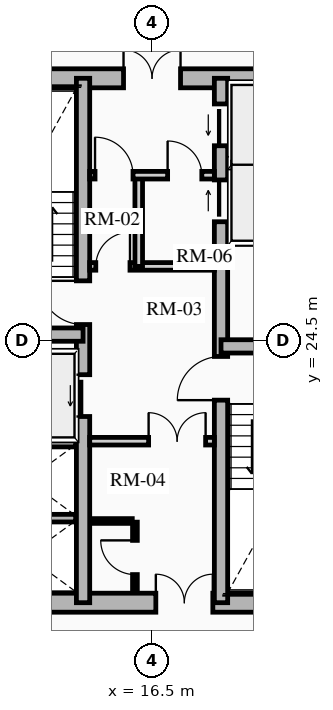
"""IFC4 building model, lengths in metres.
Left out: names, types, materials, properties, quantities, classifications, styles, units other than length and angle.
Written with IfcOpenShell. Run it as: python <this file> out.ifc"""

import sys

from ifc_helpers import new_model, si_unit, direction, frame, frame_2d, origin, place, context, subcontext, project, spatial, rectangle, extrude, source, transform, mapped, element, fill, save


model = new_model("IFC4")
c1 = context("Model", 3, precision=1e-05, world=origin(), true_north=direction((0.0, 1.0)))
c2 = subcontext(c1, "Body", "Model", "MODEL_VIEW")
j1 = project(units=[si_unit("LENGTHUNIT", "METRE"), si_unit("PLANEANGLEUNIT", "RADIAN")], contexts=[c1])
p1 = place(None, origin())
s1 = spatial("IfcSite", under=j1, at=p1, CompositionType="ELEMENT")
p2 = place(p1, origin())
s2 = spatial("IfcBuilding", under=s1, at=p2, CompositionType="ELEMENT")
p3 = place(p2, frame((0.0, 0.0, 59.83)))
s3 = spatial("IfcBuildingStorey", under=s2, at=p3, CompositionType="ELEMENT", Elevation=59.83)
p4 = place(p3, frame((11.15, 17.6, 0.0), z_axis=(0.0, 0.0, 1.0), x_axis=(1.0, 0.0, 0.0)))
e1 = element("IfcWall", 1, at=p4, inside=s3, PredefinedType="SHEAR", context=c2, shape_type="SweptSolid", body=[
    extrude(rectangle(XDim=10.7, YDim=0.5, at=frame_2d((5.35, 0.0))), origin(), (0.0, 0.0, 1.0), 2.91),
])
m1 = source(origin(), c2, "Body", "SweptSolid", [
    extrude(rectangle(XDim=1.5, YDim=2.02, at=frame_2d((0.75, 1.01))), frame((0.0, 0.26, 0.0), z_axis=(0.0, -1.0, 0.0), x_axis=(1.0, 0.0, 0.0)), (0.0, 0.0, 1.0), 0.52),
])
p5 = place(p4, frame((5.45, 0.0, 0.0)))
e2 = element("IfcOpeningElement", 2, at=p5, cuts=e1, PredefinedType="OPENING", context=c2, shape_type="MappedRepresentation", body=[
    mapped(m1, transform((0.0, 0.0, 0.0), x_axis=(1.0, 0.0, 0.0), y_axis=(0.0, 1.0, 0.0), z_axis=(0.0, 0.0, 1.0), scale=1.0)),
])
p6 = place(p3, frame((11.15, 31.4, 0.0), z_axis=(0.0, 0.0, 1.0), x_axis=(1.0, 0.0, 0.0)))
e3 = element("IfcWall", 3, at=p6, inside=s3, PredefinedType="SHEAR", context=c2, shape_type="SweptSolid", body=[
    extrude(rectangle(XDim=10.7, YDim=0.5, at=frame_2d((5.35, 0.0))), origin(), (0.0, 0.0, 1.0), 2.91),
])
p7 = place(p6, frame((4.6, 0.0, 0.0)))
e4 = element("IfcOpeningElement", 4, at=p7, cuts=e3, PredefinedType="OPENING", context=c2, shape_type="MappedRepresentation", body=[
    mapped(m1, transform((0.0, 0.0, 0.0), x_axis=(1.0, 0.0, 0.0), y_axis=(0.0, 1.0, 0.0), z_axis=(0.0, 0.0, 1.0), scale=1.0)),
])
p8 = place(p3, frame((14.685, 17.6, 0.0), z_axis=(0.0, 0.0, 1.0), x_axis=(0.0, 1.0, 0.0)))
e5 = element("IfcWall", 5, at=p8, inside=s3, PredefinedType="SHEAR", context=c2, shape_type="SweptSolid", body=[
    extrude(rectangle(XDim=13.8, YDim=0.35, at=frame_2d((6.9, 0.0))), origin(), (0.0, 0.0, 1.0), 2.91),
])
m2 = source(origin(), c2, "Body", "SweptSolid", [
    extrude(rectangle(XDim=1.1, YDim=2.015, at=frame_2d((0.55, 1.007))), frame((0.0, 0.185, 0.0), z_axis=(0.0, -1.0, 0.0), x_axis=(1.0, 0.0, 0.0)), (0.0, 0.0, 1.0), 0.37),
])
p9 = place(p8, frame((4.9, 0.0, 0.0)))
e6 = element("IfcOpeningElement", 6, at=p9, cuts=e5, PredefinedType="OPENING", context=c2, shape_type="MappedRepresentation", body=[
    mapped(m2, transform((0.0, 0.0, 0.0), x_axis=(1.0, 0.0, 0.0), y_axis=(0.0, 1.0, 0.0), z_axis=(0.0, 0.0, 1.0), scale=1.0)),
])
m3 = source(origin(), c2, "Body", "SweptSolid", [
    extrude(rectangle(XDim=1.15, YDim=2.02, at=frame_2d((0.575, 1.01))), frame((0.0, 0.185, 0.0), z_axis=(0.0, -1.0, 0.0), x_axis=(1.0, 0.0, 0.0)), (0.0, 0.0, 1.0), 0.37),
])
p10 = place(p8, frame((7.32, 0.0, 0.0)))
e7 = element("IfcOpeningElement", 7, at=p10, cuts=e5, PredefinedType="OPENING", context=c2, shape_type="MappedRepresentation", body=[
    mapped(m3, transform((0.0, 0.0, 0.0), x_axis=(1.0, 0.0, 0.0), y_axis=(0.0, 1.0, 0.0), z_axis=(0.0, 0.0, 1.0), scale=1.0)),
])
p11 = place(p3, frame((18.315, 17.6, 0.0), z_axis=(0.0, 0.0, 1.0), x_axis=(0.0, 1.0, 0.0)))
e8 = element("IfcWall", 8, at=p11, inside=s3, PredefinedType="SHEAR", context=c2, shape_type="SweptSolid", body=[
    extrude(rectangle(XDim=13.8, YDim=0.35, at=frame_2d((6.9, 0.0))), origin(), (0.0, 0.0, 1.0), 2.91),
])
p12 = place(p11, frame((10.025, 0.0, 0.0)))
e9 = element("IfcOpeningElement", 9, at=p12, cuts=e8, PredefinedType="OPENING", context=c2, shape_type="MappedRepresentation", body=[
    mapped(m2, transform((0.0, 0.0, 0.0), x_axis=(1.0, 0.0, 0.0), y_axis=(0.0, 1.0, 0.0), z_axis=(0.0, 0.0, 1.0), scale=1.0)),
])
p13 = place(p11, frame((12.025, 0.0, 0.0)))
e10 = element("IfcOpeningElement", 10, at=p13, cuts=e8, PredefinedType="OPENING", context=c2, shape_type="MappedRepresentation", body=[
    mapped(m2, transform((0.0, 0.0, 0.0), x_axis=(1.0, 0.0, 0.0), y_axis=(0.0, 1.0, 0.0), z_axis=(0.0, 0.0, 1.0), scale=1.0)),
])
p14 = place(p11, frame((5.33, 0.0, 0.0)))
e11 = element("IfcOpeningElement", 11, at=p14, cuts=e8, PredefinedType="OPENING", context=c2, shape_type="MappedRepresentation", body=[
    mapped(m3, transform((0.0, 0.0, 0.0), x_axis=(1.0, 0.0, 0.0), y_axis=(0.0, 1.0, 0.0), z_axis=(0.0, 0.0, 1.0), scale=1.0)),
])
for number, where, z_axis, x_axis in (
    (12, (11.4, 24.655, 0.0), (0.0, 0.0, 1.0), (1.0, 0.0, 0.0)),
    (13, (18.315, 24.345, 0.0), (0.0, 0.0, 1.0), (1.0, 0.0, 0.0)),
):
    element("IfcWall", number, at=place(p3, frame(where, z_axis=z_axis, x_axis=x_axis)), inside=s3, PredefinedType="SHEAR", context=c2, shape_type="SweptSolid", body=[
        extrude(rectangle(XDim=3.285, YDim=0.35, at=frame_2d((1.643, 0.0))), origin(), (0.0, 0.0, 1.0), 2.91),
    ])
for number, where, z_axis, x_axis in (
    (14, (11.52, 21.8, 0.0), (0.0, 0.0, 1.0), (1.0, 0.0, 0.0)),
    (15, (11.52, 19.825, 0.0), (0.0, 0.0, 1.0), (1.0, 0.0, 0.0)),
    (16, (18.51, 27.13, 0.0), (0.0, 0.0, 1.0), (1.0, 0.0, 0.0)),
    (17, (18.51, 29.175, 0.0), (0.0, 0.0, 1.0), (1.0, 0.0, 0.0)),
):
    element("IfcWall", number, at=place(p3, frame(where, z_axis=z_axis, x_axis=x_axis)), inside=s3, PredefinedType="SHEAR", context=c2, shape_type="SweptSolid", body=[
        extrude(rectangle(XDim=2.97, YDim=0.2, at=frame_2d((1.485, 0.0))), origin(), (0.0, 0.0, 1.0), 2.91),
    ])
p15 = place(p3, frame((14.86, 21.85, 0.0), z_axis=(0.0, 0.0, 1.0), x_axis=(1.0, 0.0, 0.0)))
e18 = element("IfcWall", 18, at=p15, inside=s3, PredefinedType="PARTITIONING", context=c2, shape_type="SweptSolid", body=[
    extrude(rectangle(XDim=3.28, YDim=0.2, at=frame_2d((1.64, 0.0))), origin(), (0.0, 0.0, 1.0), 2.635),
])
m4 = source(origin(), c2, "Body", "SweptSolid", [
    extrude(rectangle(XDim=1.5, YDim=2.02, at=frame_2d((0.75, 1.01))), frame((0.0, 0.11, 0.0), z_axis=(0.0, -1.0, 0.0), x_axis=(1.0, 0.0, 0.0)), (0.0, 0.0, 1.0), 0.22),
])
p16 = place(p15, frame((1.55, 0.0, 0.0)))
e19 = element("IfcOpeningElement", 19, at=p16, cuts=e18, PredefinedType="OPENING", context=c2, shape_type="MappedRepresentation", body=[
    mapped(m4, transform((0.0, 0.0, 0.0), x_axis=(1.0, 0.0, 0.0), y_axis=(0.0, 1.0, 0.0), z_axis=(0.0, 0.0, 1.0), scale=1.0)),
])
p17 = place(p3, frame((14.86, 26.45, 0.0), z_axis=(0.0, 0.0, 1.0), x_axis=(1.0, 0.0, 0.0)))
e20 = element("IfcWall", 20, at=p17, inside=s3, PredefinedType="PARTITIONING", context=c2, shape_type="SweptSolid", body=[
    extrude(rectangle(XDim=3.28, YDim=0.2, at=frame_2d((1.64, 0.0))), origin(), (0.0, 0.0, 1.0), 2.635),
])
m5 = source(origin(), c2, "Body", "SweptSolid", [
    extrude(rectangle(XDim=0.9, YDim=2.005, at=frame_2d((0.45, 1.002))), frame((0.0, 0.11, 0.0), z_axis=(0.0, -1.0, 0.0), x_axis=(1.0, 0.0, 0.0)), (0.0, 0.0, 1.0), 0.22),
])
p18 = place(p17, frame((0.16, 0.0, 0.0)))
e21 = element("IfcOpeningElement", 21, at=p18, cuts=e20, PredefinedType="OPENING", context=c2, shape_type="MappedRepresentation", body=[
    mapped(m5, transform((0.0, 0.0, 0.0), x_axis=(1.0, 0.0, 0.0), y_axis=(0.0, 1.0, 0.0), z_axis=(0.0, 0.0, 1.0), scale=1.0)),
])
p19 = place(p3, frame((16.15, 26.45, 0.0), z_axis=(0.0, 0.0, 1.0), x_axis=(0.0, 1.0, 0.0)))
e22 = element("IfcWall", 22, at=p19, inside=s3, PredefinedType="PARTITIONING", context=c2, shape_type="SweptSolid", body=[
    extrude(rectangle(XDim=2.4, YDim=0.2, at=frame_2d((1.2, 0.0))), origin(), (0.0, 0.0, 1.0), 2.635),
])
p20 = place(p3, frame((14.86, 28.85, 0.0), z_axis=(0.0, 0.0, 1.0), x_axis=(1.0, 0.0, 0.0)))
e23 = element("IfcWall", 23, at=p20, inside=s3, PredefinedType="PARTITIONING", context=c2, shape_type="SweptSolid", body=[
    extrude(rectangle(XDim=3.28, YDim=0.2, at=frame_2d((1.64, 0.0))), origin(), (0.0, 0.0, 1.0), 2.635),
])
m6 = source(origin(), c2, "Body", "SweptSolid", [
    extrude(rectangle(XDim=1.0, YDim=2.015, at=frame_2d((0.5, 1.007))), frame((0.0, 0.11, 0.0), z_axis=(0.0, -1.0, 0.0), x_axis=(1.0, 0.0, 0.0)), (0.0, 0.0, 1.0), 0.22),
])
p21 = place(p20, frame((0.14, 0.0, 0.0)))
e24 = element("IfcOpeningElement", 24, at=p21, cuts=e23, PredefinedType="OPENING", context=c2, shape_type="MappedRepresentation", body=[
    mapped(m6, transform((0.0, 0.0, 0.0), x_axis=(1.0, 0.0, 0.0), y_axis=(0.0, 1.0, 0.0), z_axis=(0.0, 0.0, 1.0), scale=1.0)),
])
p22 = place(p20, frame((2.05, 0.0, 0.0)))
e25 = element("IfcOpeningElement", 25, at=p22, cuts=e23, PredefinedType="OPENING", context=c2, shape_type="MappedRepresentation", body=[
    mapped(m5, transform((0.0, 0.0, 0.0), x_axis=(1.0, 0.0, 0.0), y_axis=(0.0, 1.0, 0.0), z_axis=(0.0, 0.0, 1.0), scale=1.0)),
])
p23 = place(p3, frame((16.05, 17.92, 0.0), z_axis=(0.0, 0.0, 1.0), x_axis=(0.0, 1.0, 0.0)))
e26 = element("IfcWall", 26, at=p23, inside=s3, PredefinedType="PARTITIONING", context=c2, shape_type="SweptSolid", body=[
    extrude(rectangle(XDim=1.8, YDim=0.125, at=frame_2d((0.9, 0.0))), origin(), (0.0, 0.0, 1.0), 2.635),
])
m7 = source(origin(), c2, "Body", "SweptSolid", [
    extrude(rectangle(XDim=0.9, YDim=2.005, at=frame_2d((0.45, 1.002))), frame((0.0, 0.073, 0.0), z_axis=(0.0, -1.0, 0.0), x_axis=(1.0, 0.0, 0.0)), (0.0, 0.0, 1.0), 0.145),
])
p24 = place(p23, frame((0.42, 0.0, 0.0)))
e27 = element("IfcOpeningElement", 27, at=p24, cuts=e26, PredefinedType="OPENING", context=c2, shape_type="MappedRepresentation", body=[
    mapped(m7, transform((0.0, 0.0, 0.0), x_axis=(1.0, 0.0, 0.0), y_axis=(0.0, 1.0, 0.0), z_axis=(0.0, 0.0, 1.0), scale=1.0)),
])
p25 = place(p3, frame((14.88, 19.75, 0.0), z_axis=(0.0, 0.0, 1.0), x_axis=(1.0, 0.0, 0.0)))
e28 = element("IfcWall", 28, at=p25, inside=s3, PredefinedType="PARTITIONING", context=c2, shape_type="SweptSolid", body=[
    extrude(rectangle(XDim=1.1, YDim=0.125, at=frame_2d((0.55, 0.0))), origin(), (0.0, 0.0, 1.0), 2.635),
])
m8 = source(origin(), c2, "Body", "SweptSolid", [
    extrude(rectangle(XDim=1.1, YDim=2.015, at=frame_2d((0.55, 1.007))), frame((0.0, 0.025, 0.0), z_axis=(0.0, -1.0, 0.0), x_axis=(1.0, 0.0, 0.0)), (0.0, 0.0, 1.0), 0.05),
])
p26 = place(p9, origin())
e29 = element("IfcDoor", 29, at=p26, inside=s3, OperationType="SLIDING_TO_LEFT", PredefinedType="DOOR", context=c2, shape_type="MappedRepresentation", body=[
    mapped(m8, transform((0.0, 0.0, 0.0), x_axis=(1.0, 0.0, 0.0), y_axis=(0.0, 1.0, 0.0), z_axis=(0.0, 0.0, 1.0), scale=1.0)),
])
fill(e6, e29)
p27 = place(p12, origin())
e30 = element("IfcDoor", 30, at=p27, inside=s3, OperationType="SLIDING_TO_RIGHT", PredefinedType="DOOR", context=c2, shape_type="MappedRepresentation", body=[
    mapped(m8, transform((0.0, 0.0, 0.0), x_axis=(1.0, 0.0, 0.0), y_axis=(0.0, 1.0, 0.0), z_axis=(0.0, 0.0, 1.0), scale=1.0)),
])
fill(e9, e30)
p28 = place(p13, origin())
e31 = element("IfcDoor", 31, at=p28, inside=s3, OperationType="SLIDING_TO_LEFT", PredefinedType="DOOR", context=c2, shape_type="MappedRepresentation", body=[
    mapped(m8, transform((0.0, 0.0, 0.0), x_axis=(1.0, 0.0, 0.0), y_axis=(0.0, 1.0, 0.0), z_axis=(0.0, 0.0, 1.0), scale=1.0)),
])
fill(e10, e31)
m9 = source(origin(), c2, "Body", "SweptSolid", [
    extrude(rectangle(XDim=1.15, YDim=2.02, at=frame_2d((0.575, 1.01))), frame((0.0, 0.025, 0.0), z_axis=(0.0, -1.0, 0.0), x_axis=(1.0, 0.0, 0.0)), (0.0, 0.0, 1.0), 0.05),
])
p29 = place(p10, origin())
e32 = element("IfcDoor", 32, at=p29, inside=s3, OperationType="SINGLE_SWING_RIGHT", PredefinedType="DOOR", context=c2, shape_type="MappedRepresentation", body=[
    mapped(m9, transform((0.0, 0.0, 0.0), x_axis=(1.0, 0.0, 0.0), y_axis=(0.0, 1.0, 0.0), z_axis=(0.0, 0.0, 1.0), scale=1.0)),
])
fill(e7, e32)
p30 = place(p14, origin())
e33 = element("IfcDoor", 33, at=p30, inside=s3, OperationType="SINGLE_SWING_LEFT", PredefinedType="DOOR", context=c2, shape_type="MappedRepresentation", body=[
    mapped(m9, transform((0.0, 0.0, 0.0), x_axis=(1.0, 0.0, 0.0), y_axis=(0.0, 1.0, 0.0), z_axis=(0.0, 0.0, 1.0), scale=1.0)),
])
fill(e11, e33)
m10 = source(origin(), c2, "Body", "SweptSolid", [
    extrude(rectangle(XDim=1.5, YDim=2.02, at=frame_2d((0.75, 1.01))), frame((0.0, 0.025, 0.0), z_axis=(0.0, -1.0, 0.0), x_axis=(1.0, 0.0, 0.0)), (0.0, 0.0, 1.0), 0.05),
])
p31 = place(p7, origin())
e34 = element("IfcDoor", 34, at=p31, inside=s3, OperationType="DOUBLE_DOOR_SINGLE_SWING", PredefinedType="DOOR", context=c2, shape_type="MappedRepresentation", body=[
    mapped(m10, transform((0.0, 0.0, 0.0), x_axis=(1.0, 0.0, 0.0), y_axis=(0.0, 1.0, 0.0), z_axis=(0.0, 0.0, 1.0), scale=1.0)),
])
fill(e4, e34)
p32 = place(p5, origin())
e35 = element("IfcDoor", 35, at=p32, inside=s3, OperationType="DOUBLE_DOOR_SINGLE_SWING", PredefinedType="DOOR", context=c2, shape_type="MappedRepresentation", body=[
    mapped(m10, transform((0.0, 0.0, 0.0), x_axis=(1.0, 0.0, 0.0), y_axis=(0.0, 1.0, 0.0), z_axis=(0.0, 0.0, 1.0), scale=1.0)),
])
fill(e2, e35)
p33 = place(p16, origin())
e36 = element("IfcDoor", 36, at=p33, inside=s3, OperationType="DOUBLE_DOOR_SINGLE_SWING", PredefinedType="DOOR", context=c2, shape_type="MappedRepresentation", body=[
    mapped(m10, transform((0.0, 0.0, 0.0), x_axis=(1.0, 0.0, 0.0), y_axis=(0.0, 1.0, 0.0), z_axis=(0.0, 0.0, 1.0), scale=1.0)),
])
fill(e19, e36)
m11 = source(origin(), c2, "Body", "SweptSolid", [
    extrude(rectangle(XDim=0.9, YDim=2.005, at=frame_2d((0.45, 1.002))), frame((0.0, 0.025, 0.0), z_axis=(0.0, -1.0, 0.0), x_axis=(1.0, 0.0, 0.0)), (0.0, 0.0, 1.0), 0.05),
])
p34 = place(p18, origin())
e37 = element("IfcDoor", 37, at=p34, inside=s3, OperationType="SINGLE_SWING_RIGHT", PredefinedType="DOOR", context=c2, shape_type="MappedRepresentation", body=[
    mapped(m11, transform((0.0, 0.0, 0.0), x_axis=(1.0, 0.0, 0.0), y_axis=(0.0, 1.0, 0.0), z_axis=(0.0, 0.0, 1.0), scale=1.0)),
])
fill(e21, e37)
m12 = source(origin(), c2, "Body", "SweptSolid", [
    extrude(rectangle(XDim=1.0, YDim=2.015, at=frame_2d((0.5, 1.007))), frame((0.0, 0.025, 0.0), z_axis=(0.0, -1.0, 0.0), x_axis=(1.0, 0.0, 0.0)), (0.0, 0.0, 1.0), 0.05),
])
p35 = place(p21, origin())
e38 = element("IfcDoor", 38, at=p35, inside=s3, OperationType="SINGLE_SWING_LEFT", PredefinedType="DOOR", context=c2, shape_type="MappedRepresentation", body=[
    mapped(m12, transform((0.0, 0.0, 0.0), x_axis=(1.0, 0.0, 0.0), y_axis=(0.0, 1.0, 0.0), z_axis=(0.0, 0.0, 1.0), scale=1.0)),
])
fill(e24, e38)
p36 = place(p24, origin())
e39 = element("IfcDoor", 39, at=p36, inside=s3, OperationType="SINGLE_SWING_RIGHT", PredefinedType="DOOR", context=c2, shape_type="MappedRepresentation", body=[
    mapped(m11, transform((0.0, 0.0, 0.0), x_axis=(1.0, 0.0, 0.0), y_axis=(0.0, 1.0, 0.0), z_axis=(0.0, 0.0, 1.0), scale=1.0)),
])
fill(e27, e39)
p37 = place(p22, origin())
e40 = element("IfcDoor", 40, at=p37, inside=s3, OperationType="SINGLE_SWING_LEFT", PredefinedType="DOOR", context=c2, shape_type="MappedRepresentation", body=[
    mapped(m11, transform((0.0, 0.0, 0.0), x_axis=(1.0, 0.0, 0.0), y_axis=(0.0, 1.0, 0.0), z_axis=(0.0, 0.0, 1.0), scale=1.0)),
])
fill(e25, e40)
save(model, sys.argv[1])
